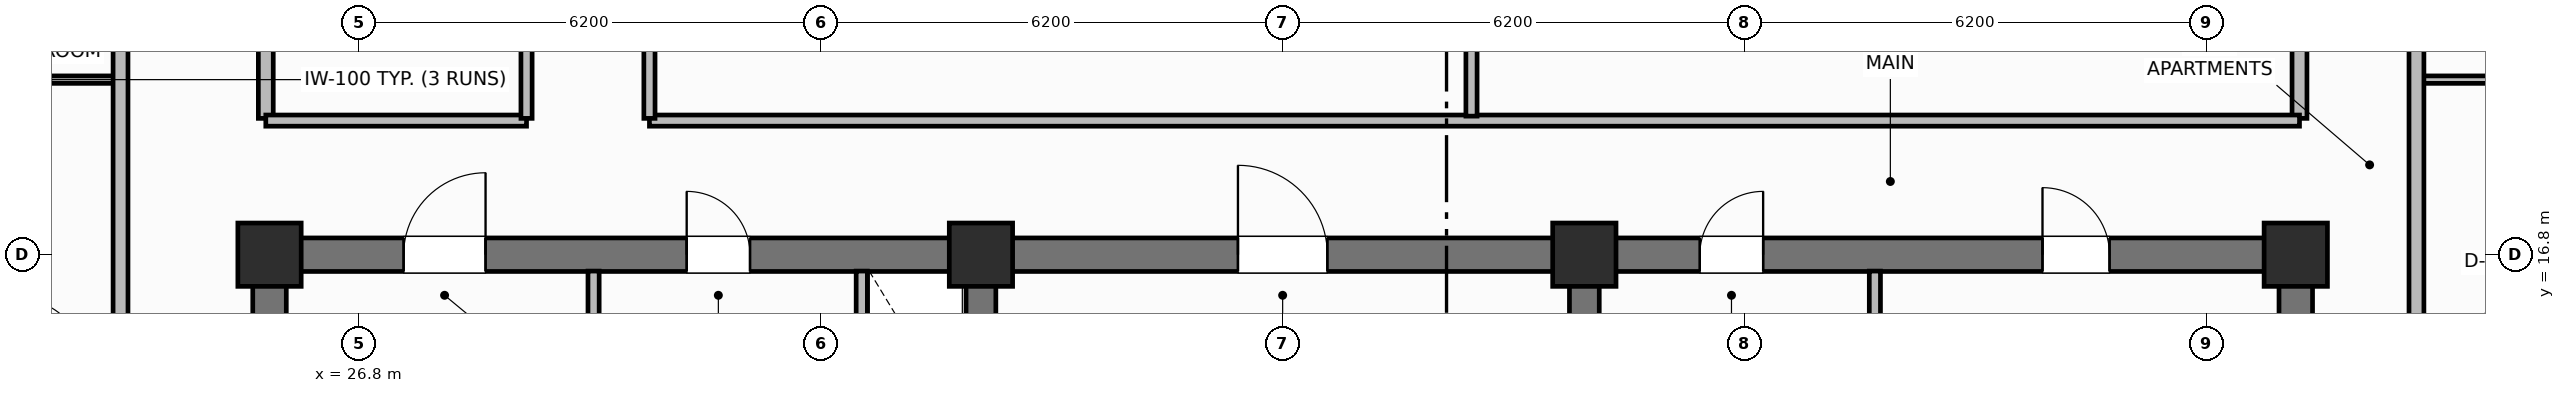
"""IFC4 building model, lengths in metres.
Left out: names, types, materials, properties, quantities, classifications, styles, units other than length and angle.
Written with IfcOpenShell. Run it as: python <this file> out.ifc"""

import sys

from ifc_helpers import new_model, si_unit, direction, frame, frame_2d, origin, origin_2d, place, context, subcontext, project, spatial, rectangle, extrude, element, fill, save


model = new_model("IFC4")
c1 = context("Model", 3, precision=1e-05, world=origin(), true_north=direction((0.0, 1.0)))
c2 = subcontext(c1, "Body", "Model", "MODEL_VIEW")
j1 = project(units=[si_unit("LENGTHUNIT", "METRE"), si_unit("PLANEANGLEUNIT", "RADIAN")], contexts=[c1])
p1 = place(None, origin())
s1 = spatial("IfcSite", under=j1, at=p1, CompositionType="ELEMENT")
p2 = place(p1, origin())
s2 = spatial("IfcBuilding", under=s1, at=p2, CompositionType="ELEMENT")
p3 = place(p2, frame((0.0, 0.0, 251.7)))
s3 = spatial("IfcBuildingStorey", under=s2, at=p3, CompositionType="ELEMENT", Elevation=251.7)
for number, where, z_axis, x_axis in (
    (1, (25.6, 10.825, 0.0), (0.0, 0.0, 1.0), (0.0, 1.0, 0.0)),
    (2, (52.8, 10.825, 0.0), (0.0, 0.0, 1.0), (0.0, 1.0, 0.0)),
):
    element("IfcWall", number, at=place(p3, frame(where, z_axis=z_axis, x_axis=x_axis)), inside=s3, PredefinedType="SHEAR", context=c2, shape_type="SweptSolid", body=[
        extrude(rectangle(XDim=5.75, YDim=0.45, at=frame_2d((2.875, 0.0))), origin(), (0.0, 0.0, 1.0), 3.7),
    ])
p4 = place(p3, frame((25.6, 16.8, 0.0), z_axis=(0.0, 0.0, 1.0), x_axis=(1.0, 0.0, 0.0)))
e3 = element("IfcWall", 3, at=p4, inside=s3, PredefinedType="SHEAR", context=c2, shape_type="SweptSolid", body=[
    extrude(rectangle(XDim=27.2, YDim=0.45, at=frame_2d((13.6, 0.0))), origin(), (0.0, 0.0, 1.0), 3.7),
])
p5 = place(p4, frame((1.8, 0.0, 0.0)))
e4 = element("IfcOpeningElement", 4, at=p5, cuts=e3, PredefinedType="OPENING", context=c2, shape_type="SweptSolid", body=[
    extrude(rectangle(XDim=1.1, YDim=2.15, at=frame_2d((0.55, 1.075))), frame((0.0, 0.235, 0.0), z_axis=(0.0, -1.0, 0.0), x_axis=(1.0, 0.0, 0.0)), (0.0, 0.0, 1.0), 0.47),
])
p6 = place(p4, frame((5.6, 0.0, 0.0)))
e5 = element("IfcOpeningElement", 5, at=p6, cuts=e3, PredefinedType="OPENING", context=c2, shape_type="SweptSolid", body=[
    extrude(rectangle(XDim=0.85, YDim=2.1, at=frame_2d((0.425, 1.05))), frame((0.0, 0.235, 0.0), z_axis=(0.0, -1.0, 0.0), x_axis=(1.0, 0.0, 0.0)), (0.0, 0.0, 1.0), 0.47),
])
p7 = place(p4, frame((13.0, 0.0, 0.0)))
e6 = element("IfcOpeningElement", 6, at=p7, cuts=e3, PredefinedType="OPENING", context=c2, shape_type="SweptSolid", body=[
    extrude(rectangle(XDim=1.2, YDim=2.15, at=frame_2d((0.6, 1.075))), frame((0.0, 0.235, 0.0), z_axis=(0.0, -1.0, 0.0), x_axis=(1.0, 0.0, 0.0)), (0.0, 0.0, 1.0), 0.47),
])
p8 = place(p4, frame((19.2, 0.0, 0.0)))
e7 = element("IfcOpeningElement", 7, at=p8, cuts=e3, PredefinedType="OPENING", context=c2, shape_type="SweptSolid", body=[
    extrude(rectangle(XDim=0.85, YDim=2.1, at=frame_2d((0.425, 1.05))), frame((0.0, 0.235, 0.0), z_axis=(0.0, -1.0, 0.0), x_axis=(1.0, 0.0, 0.0)), (0.0, 0.0, 1.0), 0.47),
])
p9 = place(p4, frame((23.8, 0.0, 0.0)))
e8 = element("IfcOpeningElement", 8, at=p9, cuts=e3, PredefinedType="OPENING", context=c2, shape_type="SweptSolid", body=[
    extrude(rectangle(XDim=0.9, YDim=2.1, at=frame_2d((0.45, 1.05))), frame((0.0, 0.235, 0.0), z_axis=(0.0, -1.0, 0.0), x_axis=(1.0, 0.0, 0.0)), (0.0, 0.0, 1.0), 0.47),
])
for number, where, z_axis, x_axis in (
    (9, (35.15, 10.825, 0.0), (0.0, 0.0, 1.0), (0.0, 1.0, 0.0)),
    (10, (43.25, 10.825, 0.0), (0.0, 0.0, 1.0), (0.0, 1.0, 0.0)),
):
    element("IfcWall", number, at=place(p3, frame(where, z_axis=z_axis, x_axis=x_axis)), inside=s3, PredefinedType="SHEAR", context=c2, shape_type="SweptSolid", body=[
        extrude(rectangle(XDim=5.75, YDim=0.4, at=frame_2d((2.875, 0.0))), origin(), (0.0, 0.0, 1.0), 3.7),
    ])
for number, where, z_axis, x_axis in (
    (11, (25.6, 16.8, 0.0), (0.0, 0.0, 1.0), (1.0, 0.0, 0.0)),
    (12, (35.15, 16.8, 0.0), (0.0, 0.0, 1.0), (1.0, 0.0, 0.0)),
    (13, (43.25, 16.8, 0.0), (0.0, 0.0, 1.0), (1.0, 0.0, 0.0)),
    (14, (52.8, 16.8, 0.0), (0.0, 0.0, 1.0), (1.0, 0.0, 0.0)),
):
    element("IfcColumn", number, at=place(p3, frame(where, z_axis=z_axis, x_axis=x_axis)), inside=s3, PredefinedType="COLUMN", context=c2, shape_type="SweptSolid", body=[
        extrude(rectangle(XDim=0.85, YDim=0.85, at=origin_2d()), origin(), (0.0, 0.0, 1.0), 3.7),
    ])
p10 = place(p3, frame((29.95, 14.5, 0.0), z_axis=(0.0, 0.0, 1.0), x_axis=(0.0, 1.0, 0.0)))
e15 = element("IfcWall", 15, at=p10, inside=s3, PredefinedType="PARTITIONING", context=c2, shape_type="SweptSolid", body=[
    extrude(rectangle(XDim=2.08, YDim=0.15, at=frame_2d((1.04, 0.0))), origin(), (0.0, 0.0, 1.0), 2.56),
])
p11 = place(p3, frame((33.55, 14.5, 0.0), z_axis=(0.0, 0.0, 1.0), x_axis=(0.0, 1.0, 0.0)))
e16 = element("IfcWall", 16, at=p11, inside=s3, PredefinedType="PARTITIONING", context=c2, shape_type="SweptSolid", body=[
    extrude(rectangle(XDim=2.08, YDim=0.15, at=frame_2d((1.04, 0.0))), origin(), (0.0, 0.0, 1.0), 2.56),
])
p12 = place(p11, frame((0.55, 0.0, 0.0)))
e17 = element("IfcOpeningElement", 17, at=p12, cuts=e16, PredefinedType="OPENING", context=c2, shape_type="SweptSolid", body=[
    extrude(rectangle(XDim=0.85, YDim=2.05, at=frame_2d((0.425, 1.025))), frame((0.0, 0.085, 0.0), z_axis=(0.0, -1.0, 0.0), x_axis=(1.0, 0.0, 0.0)), (0.0, 0.0, 1.0), 0.17),
])
p13 = place(p3, frame((47.15, 10.95, 0.0), z_axis=(0.0, 0.0, 1.0), x_axis=(0.0, 1.0, 0.0)))
e18 = element("IfcWall", 18, at=p13, inside=s3, PredefinedType="PARTITIONING", context=c2, shape_type="SweptSolid", body=[
    extrude(rectangle(XDim=5.63, YDim=0.15, at=frame_2d((2.815, 0.0))), origin(), (0.0, 0.0, 1.0), 2.56),
])
for number, where, z_axis, x_axis in (
    (19, (25.55, 18.63, 0.0), (0.0, 0.0, 1.0), (0.0, 1.0, 0.0)),
    (20, (52.85, 18.63, 0.0), (0.0, 0.0, 1.0), (0.0, 1.0, 0.0)),
):
    element("IfcWall", number, at=place(p3, frame(where, z_axis=z_axis, x_axis=x_axis)), inside=s3, PredefinedType="PARTITIONING", context=c2, shape_type="SweptSolid", body=[
        extrude(rectangle(XDim=19.14, YDim=0.2, at=frame_2d((9.57, 0.0))), origin(), (0.0, 0.0, 1.0), 2.56),
    ])
p14 = place(p3, frame((25.55, 18.6, 0.0), z_axis=(0.0, 0.0, 1.0), x_axis=(1.0, 0.0, 0.0)))
e21 = element("IfcWall", 21, at=p14, inside=s3, PredefinedType="PARTITIONING", context=c2, shape_type="SweptSolid", body=[
    extrude(rectangle(XDim=3.5, YDim=0.15, at=frame_2d((1.75, 0.0))), origin(), (0.0, 0.0, 1.0), 2.56),
])
p15 = place(p3, frame((30.7, 18.6, 0.0), z_axis=(0.0, 0.0, 1.0), x_axis=(1.0, 0.0, 0.0)))
e22 = element("IfcWall", 22, at=p15, inside=s3, PredefinedType="PARTITIONING", context=c2, shape_type="SweptSolid", body=[
    extrude(rectangle(XDim=22.15, YDim=0.15, at=frame_2d((11.075, 0.0))), origin(), (0.0, 0.0, 1.0), 2.56),
])
p16 = place(p3, frame((41.735, 18.66, 0.0), z_axis=(0.0, 0.0, 1.0), x_axis=(0.0, 1.0, 0.0)))
e23 = element("IfcWall", 23, at=p16, inside=s3, PredefinedType="PARTITIONING", context=c2, shape_type="SweptSolid", body=[
    extrude(rectangle(XDim=19.08, YDim=0.15, at=frame_2d((9.54, 0.0))), origin(), (0.0, 0.0, 1.0), 2.56),
])
p17 = place(p16, frame((6.5, 0.0, 0.0)))
e24 = element("IfcOpeningElement", 24, at=p17, cuts=e23, PredefinedType="OPENING", context=c2, shape_type="SweptSolid", body=[
    extrude(rectangle(XDim=1.0, YDim=2.15, at=frame_2d((0.5, 1.075))), frame((0.0, 0.085, 0.0), z_axis=(0.0, -1.0, 0.0), x_axis=(1.0, 0.0, 0.0)), (0.0, 0.0, 1.0), 0.17),
])
p18 = place(p3, frame((29.05, 18.63, 0.0), z_axis=(0.0, 0.0, 1.0), x_axis=(0.0, 1.0, 0.0)))
e25 = element("IfcWall", 25, at=p18, inside=s3, PredefinedType="PARTITIONING", context=c2, shape_type="SweptSolid", body=[
    extrude(rectangle(XDim=19.14, YDim=0.15, at=frame_2d((9.57, 0.0))), origin(), (0.0, 0.0, 1.0), 2.56),
])
p19 = place(p18, frame((5.5, 0.0, 0.0)))
e26 = element("IfcOpeningElement", 26, at=p19, cuts=e25, PredefinedType="OPENING", context=c2, shape_type="SweptSolid", body=[
    extrude(rectangle(XDim=1.0, YDim=2.15, at=frame_2d((0.5, 1.075))), frame((0.0, 0.085, 0.0), z_axis=(0.0, -1.0, 0.0), x_axis=(1.0, 0.0, 0.0)), (0.0, 0.0, 1.0), 0.17),
])
p20 = place(p3, frame((30.7, 18.63, 0.0), z_axis=(0.0, 0.0, 1.0), x_axis=(0.0, 1.0, 0.0)))
e27 = element("IfcWall", 27, at=p20, inside=s3, PredefinedType="PARTITIONING", context=c2, shape_type="SweptSolid", body=[
    extrude(rectangle(XDim=19.14, YDim=0.15, at=frame_2d((9.57, 0.0))), origin(), (0.0, 0.0, 1.0), 2.56),
])
p21 = place(p20, frame((5.5, 0.0, 0.0)))
e28 = element("IfcOpeningElement", 28, at=p21, cuts=e27, PredefinedType="OPENING", context=c2, shape_type="SweptSolid", body=[
    extrude(rectangle(XDim=1.0, YDim=2.15, at=frame_2d((0.5, 1.075))), frame((0.0, 0.085, 0.0), z_axis=(0.0, -1.0, 0.0), x_axis=(1.0, 0.0, 0.0)), (0.0, 0.0, 1.0), 0.17),
])
p22 = place(p3, frame((21.65, 19.15, 0.0), z_axis=(0.0, 0.0, 1.0), x_axis=(1.0, 0.0, 0.0)))
e29 = element("IfcWall", 29, at=p22, inside=s3, PredefinedType="PARTITIONING", context=c2, shape_type="SweptSolid", body=[
    extrude(rectangle(XDim=1.95, YDim=0.1, at=frame_2d((0.975, 0.0))), origin(), (0.0, 0.0, 1.0), 2.56),
])
p23 = place(p3, frame((23.6, 9.95, 0.0), z_axis=(0.0, 0.0, 1.0), x_axis=(0.0, 1.0, 0.0)))
e30 = element("IfcWall", 30, at=p23, inside=s3, PredefinedType="PARTITIONING", context=c2, shape_type="SweptSolid", body=[
    extrude(rectangle(XDim=36.5, YDim=0.2, at=frame_2d((18.25, 0.0))), origin(), (0.0, 0.0, 1.0), 2.56),
])
p24 = place(p23, frame((3.25, 0.0, 0.0)))
e31 = element("IfcOpeningElement", 31, at=p24, cuts=e30, PredefinedType="OPENING", context=c2, shape_type="SweptSolid", body=[
    extrude(rectangle(XDim=1.0, YDim=2.15, at=frame_2d((0.5, 1.075))), frame((0.0, 0.11, 0.0), z_axis=(0.0, -1.0, 0.0), x_axis=(1.0, 0.0, 0.0)), (0.0, 0.0, 1.0), 0.22),
])
p25 = place(p23, frame((23.5, 0.0, 0.0)))
e32 = element("IfcOpeningElement", 32, at=p25, cuts=e30, PredefinedType="OPENING", context=c2, shape_type="SweptSolid", body=[
    extrude(rectangle(XDim=1.0, YDim=2.15, at=frame_2d((0.5, 1.075))), frame((0.0, 0.11, 0.0), z_axis=(0.0, -1.0, 0.0), x_axis=(1.0, 0.0, 0.0)), (0.0, 0.0, 1.0), 0.22),
])
p26 = place(p3, frame((54.42, 19.15, 0.0), z_axis=(0.0, 0.0, 1.0), x_axis=(1.0, 0.0, 0.0)))
e33 = element("IfcWall", 33, at=p26, inside=s3, PredefinedType="PARTITIONING", context=c2, shape_type="SweptSolid", body=[
    extrude(rectangle(XDim=1.95, YDim=0.1, at=frame_2d((0.975, 0.0))), origin(), (0.0, 0.0, 1.0), 2.56),
])
p27 = place(p3, frame((54.42, 9.95, 0.0), z_axis=(0.0, 0.0, 1.0), x_axis=(0.0, 1.0, 0.0)))
e34 = element("IfcWall", 34, at=p27, inside=s3, PredefinedType="PARTITIONING", context=c2, shape_type="SweptSolid", body=[
    extrude(rectangle(XDim=36.5, YDim=0.2, at=frame_2d((18.25, 0.0))), origin(), (0.0, 0.0, 1.0), 2.56),
])
p28 = place(p27, frame((3.25, 0.0, 0.0)))
e35 = element("IfcOpeningElement", 35, at=p28, cuts=e34, PredefinedType="OPENING", context=c2, shape_type="SweptSolid", body=[
    extrude(rectangle(XDim=1.0, YDim=2.15, at=frame_2d((0.5, 1.075))), frame((0.0, 0.11, 0.0), z_axis=(0.0, -1.0, 0.0), x_axis=(1.0, 0.0, 0.0)), (0.0, 0.0, 1.0), 0.22),
])
p29 = place(p5, origin())
e36 = element("IfcDoor", 36, at=p29, inside=s3, OperationType="SINGLE_SWING_RIGHT", PredefinedType="DOOR", context=c2, shape_type="SweptSolid", body=[
    extrude(rectangle(XDim=1.1, YDim=2.15, at=frame_2d((0.55, 1.075))), frame((0.0, 0.025, 0.0), z_axis=(0.0, -1.0, 0.0), x_axis=(1.0, 0.0, 0.0)), (0.0, 0.0, 1.0), 0.05),
])
fill(e4, e36)
p30 = place(p6, origin())
e37 = element("IfcDoor", 37, at=p30, inside=s3, OperationType="SINGLE_SWING_LEFT", PredefinedType="DOOR", context=c2, shape_type="SweptSolid", body=[
    extrude(rectangle(XDim=0.85, YDim=2.1, at=frame_2d((0.425, 1.05))), frame((0.0, 0.025, 0.0), z_axis=(0.0, -1.0, 0.0), x_axis=(1.0, 0.0, 0.0)), (0.0, 0.0, 1.0), 0.05),
])
fill(e5, e37)
p31 = place(p7, origin())
e38 = element("IfcDoor", 38, at=p31, inside=s3, OperationType="SINGLE_SWING_LEFT", PredefinedType="DOOR", context=c2, shape_type="SweptSolid", body=[
    extrude(rectangle(XDim=1.2, YDim=2.15, at=frame_2d((0.6, 1.075))), frame((0.0, 0.025, 0.0), z_axis=(0.0, -1.0, 0.0), x_axis=(1.0, 0.0, 0.0)), (0.0, 0.0, 1.0), 0.05),
])
fill(e6, e38)
p32 = place(p8, origin())
e39 = element("IfcDoor", 39, at=p32, inside=s3, OperationType="SINGLE_SWING_RIGHT", PredefinedType="DOOR", context=c2, shape_type="SweptSolid", body=[
    extrude(rectangle(XDim=0.85, YDim=2.1, at=frame_2d((0.425, 1.05))), frame((0.0, 0.025, 0.0), z_axis=(0.0, -1.0, 0.0), x_axis=(1.0, 0.0, 0.0)), (0.0, 0.0, 1.0), 0.05),
])
fill(e7, e39)
p33 = place(p9, origin())
e40 = element("IfcDoor", 40, at=p33, inside=s3, OperationType="SINGLE_SWING_LEFT", PredefinedType="DOOR", context=c2, shape_type="SweptSolid", body=[
    extrude(rectangle(XDim=0.9, YDim=2.1, at=frame_2d((0.45, 1.05))), frame((0.0, 0.025, 0.0), z_axis=(0.0, -1.0, 0.0), x_axis=(1.0, 0.0, 0.0)), (0.0, 0.0, 1.0), 0.05),
])
fill(e8, e40)
save(model, sys.argv[1])
